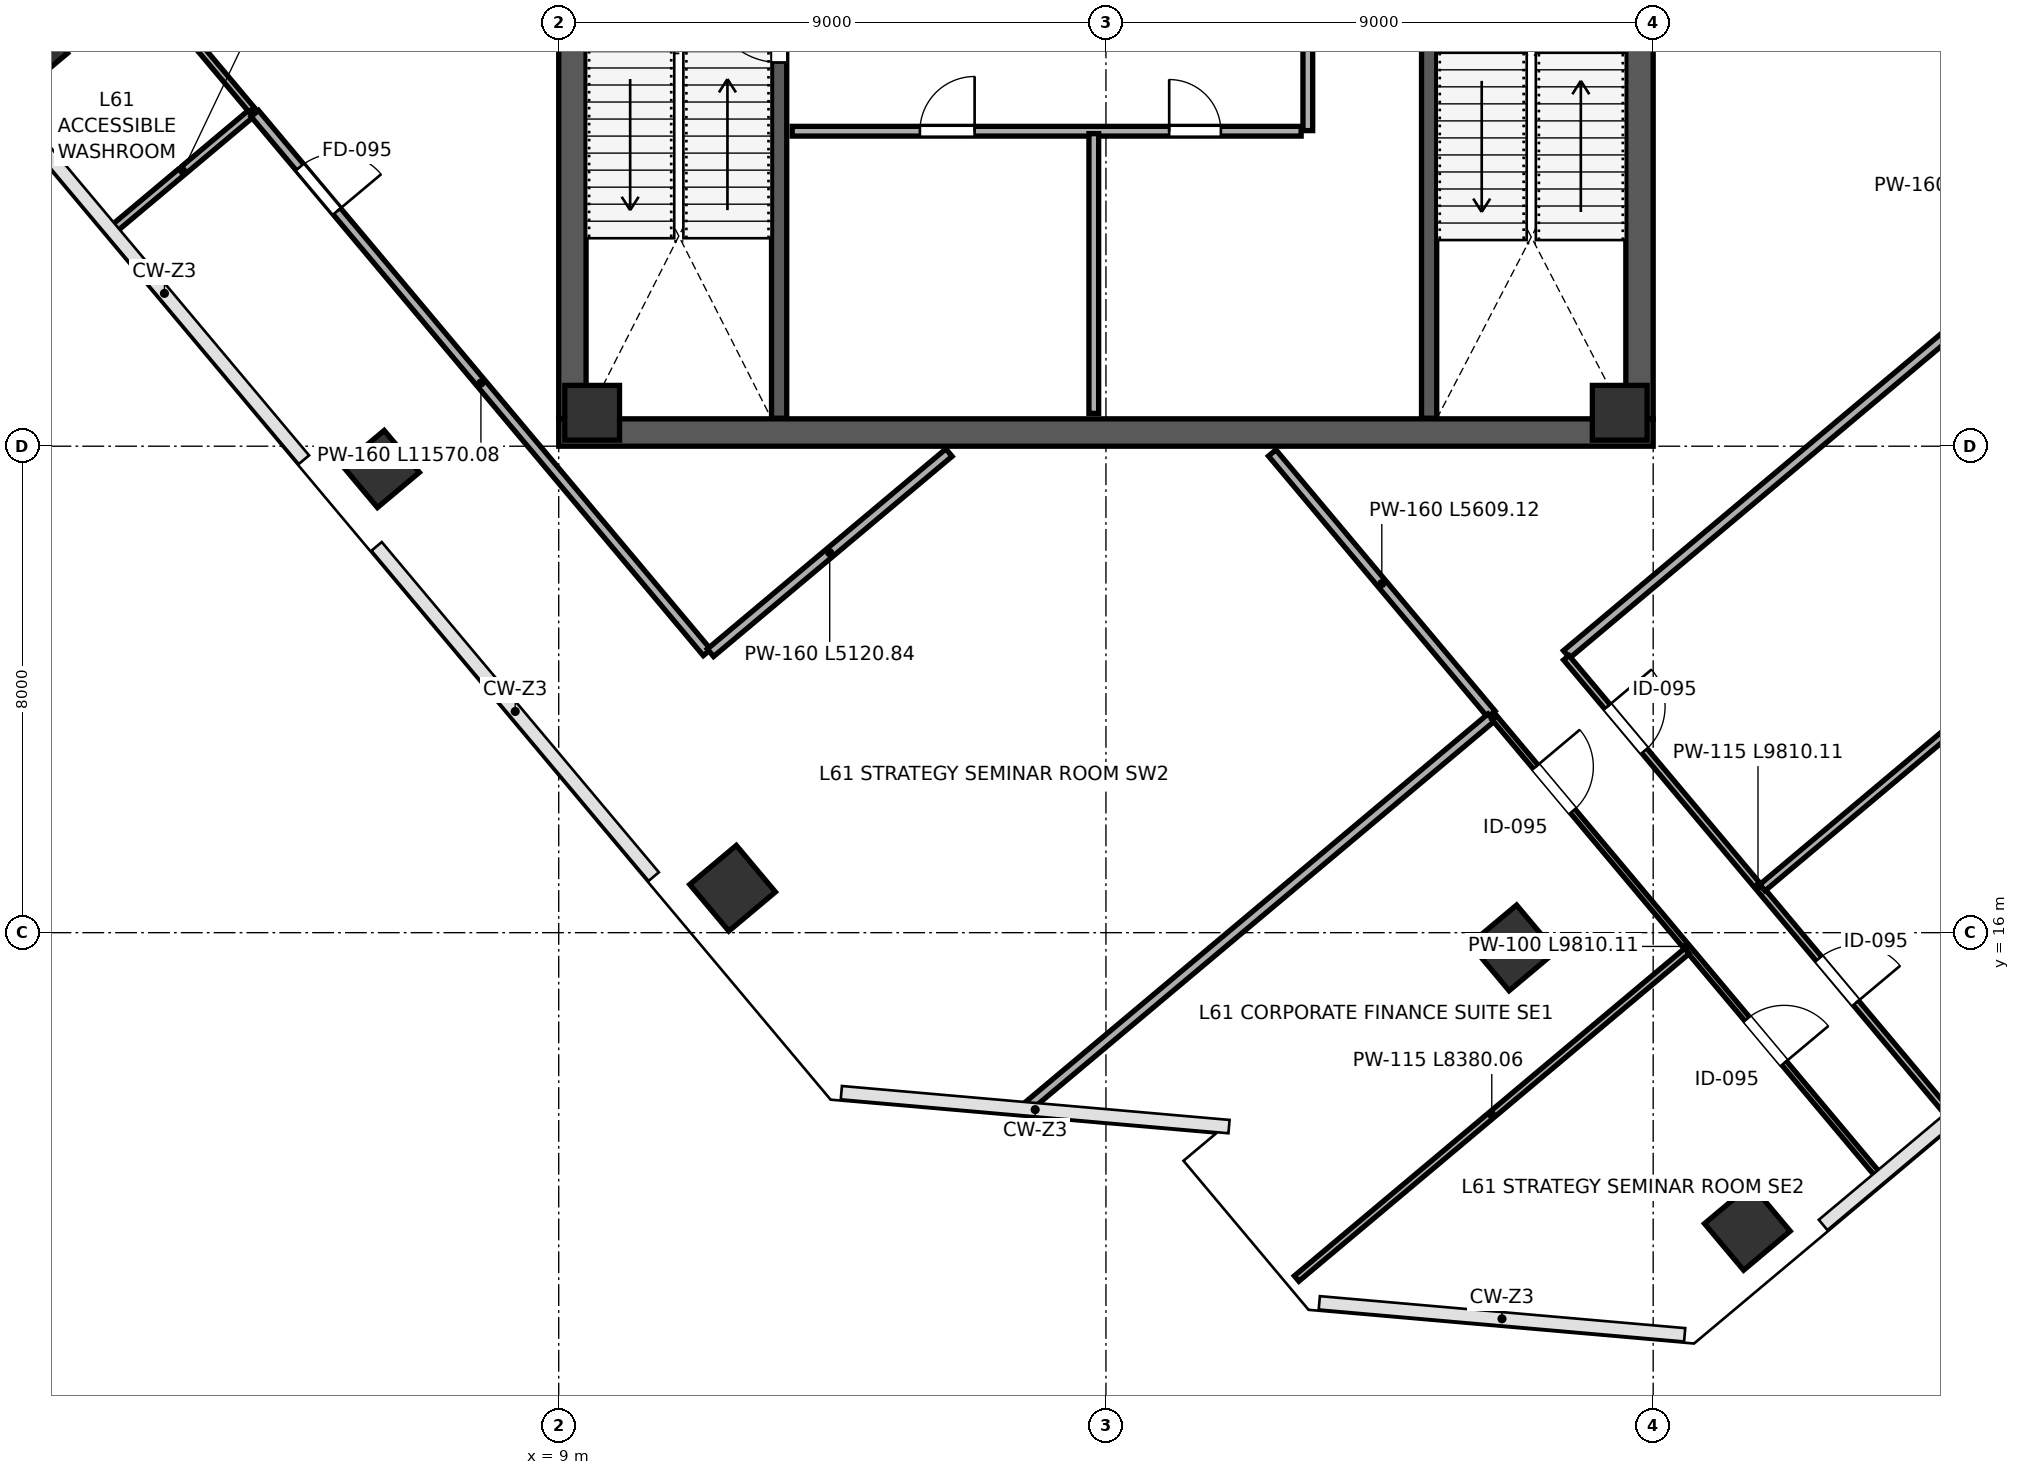
"""IFC4 building model, lengths in metres.
Left out: names, types, materials, properties, quantities, classifications, styles, units other than length and angle.
Written with IfcOpenShell. Run it as: python <this file> out.ifc"""

import sys

from ifc_helpers import new_model, si_unit, direction, frame, frame_2d, origin, origin_2d, place, context, subcontext, project, spatial, rectangle, extrude, source, transform, mapped, element, fill, save


model = new_model("IFC4")
c1 = context("Model", 3, precision=1e-05, world=origin(), true_north=direction((0.0, 1.0)))
c2 = subcontext(c1, "Body", "Model", "MODEL_VIEW")
j1 = project(units=[si_unit("LENGTHUNIT", "METRE"), si_unit("PLANEANGLEUNIT", "RADIAN")], contexts=[c1])
p1 = place(None, origin())
s1 = spatial("IfcSite", under=j1, at=p1, CompositionType="ELEMENT")
p2 = place(p1, origin())
s2 = spatial("IfcBuilding", under=s1, at=p2, CompositionType="ELEMENT")
p3 = place(p2, frame((0.0, 0.0, 271.0)))
s3 = spatial("IfcBuildingStorey", under=s2, at=p3, CompositionType="ELEMENT", Elevation=271.0)
m1 = source(origin(), c2, "Body", "SweptSolid", [
    extrude(rectangle(XDim=0.9, YDim=0.9, at=origin_2d()), origin(), (0.0, 0.0, 1.0), 4.198),
])
for number, where, z_axis, x_axis in (
    (1, (9.55, 24.55, 0.001), (0.0, 0.0, 1.0), (1.0, 0.0, 0.0)),
    (2, (26.45, 24.55, 0.001), (0.0, 0.0, 1.0), (1.0, 0.0, 0.0)),
):
    element("IfcColumn", number, at=place(p3, frame(where, z_axis=z_axis, x_axis=x_axis)), inside=s3, PredefinedType="COLUMN", context=c2, shape_type="MappedRepresentation", body=[
        mapped(m1, transform((0.0, 0.0, 0.0), scale=1.0)),
    ])
m2 = source(origin(), c2, "Body", "SweptSolid", [
    extrude(rectangle(XDim=0.9, YDim=0.9, at=origin_2d()), origin(), (0.0, 0.0, 1.0), 4.198),
])
for number, where, z_axis, x_axis in (
    (3, (0.289, 30.52, 0.001), (0.0, 0.0, 1.0), (-0.643, 0.766, 0.0)),
    (4, (6.074, 23.625, 0.001), (0.0, 0.0, 1.0), (-0.643, 0.766, 0.0)),
):
    element("IfcColumn", number, at=place(p3, frame(where, z_axis=z_axis, x_axis=x_axis)), inside=s3, PredefinedType="COLUMN", context=c2, shape_type="MappedRepresentation", body=[
        mapped(m2, transform((0.0, 0.0, 0.0), scale=1.0)),
    ])
m3 = source(origin(), c2, "Body", "SweptSolid", [
    extrude(rectangle(XDim=1.0, YDim=1.0, at=origin_2d()), origin(), (0.0, 0.0, 1.0), 4.198),
])
p4 = place(p3, frame((11.859, 16.731, 0.001), z_axis=(0.0, 0.0, 1.0), x_axis=(-0.642787609687, 0.766044443119, 0.0)))
e5 = element("IfcColumn", 5, at=p4, inside=s3, PredefinedType="COLUMN", context=c2, shape_type="MappedRepresentation", body=[
    mapped(m3, transform((0.0, 0.0, 0.0), scale=1.0)),
])
m4 = source(origin(), c2, "Body", "SweptSolid", [
    extrude(rectangle(XDim=1.0, YDim=1.0, at=origin_2d()), origin(), (0.0, 0.0, 1.0), 4.198),
])
p5 = place(p3, frame((24.692, 15.75, 0.001), z_axis=(0.0, 0.0, 1.0), x_axis=(-0.642787609687, 0.766044443119, 0.0)))
e6 = element("IfcColumn", 6, at=p5, inside=s3, PredefinedType="COLUMN", context=c2, shape_type="MappedRepresentation", body=[
    mapped(m4, transform((0.0, 0.0, 0.0), scale=1.0)),
])
p6 = place(p3, frame((28.549, 11.154, 0.001), z_axis=(0.0, 0.0, 1.0), x_axis=(-0.642787609687, 0.766044443119, 0.0)))
e7 = element("IfcColumn", 7, at=p6, inside=s3, PredefinedType="COLUMN", context=c2, shape_type="MappedRepresentation", body=[
    mapped(m3, transform((0.0, 0.0, 0.0), scale=1.0)),
])
p7 = place(p3, frame((9.225, 24.45, 0.0), z_axis=(0.0, 0.0, 1.0), x_axis=(0.0, 1.0, 0.0)))
e8 = element("IfcWall", 8, at=p7, inside=s3, PredefinedType="SHEAR", context=c2, shape_type="SweptSolid", body=[
    extrude(rectangle(XDim=15.1, YDim=0.45, at=frame_2d((7.55, 0.0))), origin(), (0.0, 0.0, 1.0), 3.96),
])
p8 = place(p7, frame((8.7, 0.0, 0.0)))
e9 = element("IfcOpeningElement", 9, at=p8, cuts=e8, PredefinedType="OPENING", context=c2, shape_type="SweptSolid", body=[
    extrude(rectangle(XDim=1.15, YDim=2.2, at=frame_2d((0.575, 1.1))), frame((0.0, 0.235, 0.0), z_axis=(0.0, -1.0, 0.0), x_axis=(1.0, 0.0, 0.0)), (0.0, 0.0, 1.0), 0.47),
])
p9 = place(p3, frame((26.775, 24.45, 0.0), z_axis=(0.0, 0.0, 1.0), x_axis=(0.0, 1.0, 0.0)))
e10 = element("IfcWall", 10, at=p9, inside=s3, PredefinedType="SHEAR", context=c2, shape_type="SweptSolid", body=[
    extrude(rectangle(XDim=15.1, YDim=0.45, at=frame_2d((7.55, 0.0))), origin(), (0.0, 0.0, 1.0), 3.96),
])
p10 = place(p9, frame((8.6, 0.0, 0.0)))
e11 = element("IfcOpeningElement", 11, at=p10, cuts=e10, PredefinedType="OPENING", context=c2, shape_type="SweptSolid", body=[
    extrude(rectangle(XDim=1.15, YDim=2.2, at=frame_2d((0.575, 1.1))), frame((0.0, 0.235, 0.0), z_axis=(0.0, -1.0, 0.0), x_axis=(1.0, 0.0, 0.0)), (0.0, 0.0, 1.0), 0.47),
])
p11 = place(p3, frame((9.0, 24.225, 0.0), z_axis=(0.0, 0.0, 1.0), x_axis=(1.0, 0.0, 0.0)))
e12 = element("IfcWall", 12, at=p11, inside=s3, PredefinedType="SHEAR", context=c2, shape_type="SweptSolid", body=[
    extrude(rectangle(XDim=18.0, YDim=0.45, at=frame_2d((9.0, 0.0))), origin(), (0.0, 0.0, 1.0), 3.96),
])
p12 = place(p3, frame((12.625, 24.46, 0.0), z_axis=(0.0, 0.0, 1.0), x_axis=(0.0, 1.0, 0.0)))
e13 = element("IfcWall", 13, at=p12, inside=s3, PredefinedType="SHEAR", context=c2, shape_type="SweptSolid", body=[
    extrude(rectangle(XDim=7.49, YDim=0.25, at=frame_2d((3.745, 0.0))), origin(), (0.0, 0.0, 1.0), 3.96),
])
p13 = place(p12, frame((5.85, 0.0, 0.0)))
e14 = element("IfcOpeningElement", 14, at=p13, cuts=e13, PredefinedType="OPENING", context=c2, shape_type="SweptSolid", body=[
    extrude(rectangle(XDim=1.15, YDim=2.2, at=frame_2d((0.575, 1.1))), frame((0.0, 0.135, 0.0), z_axis=(0.0, -1.0, 0.0), x_axis=(1.0, 0.0, 0.0)), (0.0, 0.0, 1.0), 0.27),
])
p14 = place(p3, frame((23.315, 24.46, 0.0), z_axis=(0.0, 0.0, 1.0), x_axis=(0.0, 1.0, 0.0)))
e15 = element("IfcWall", 15, at=p14, inside=s3, PredefinedType="SHEAR", context=c2, shape_type="SweptSolid", body=[
    extrude(rectangle(XDim=7.49, YDim=0.25, at=frame_2d((3.745, 0.0))), origin(), (0.0, 0.0, 1.0), 3.96),
])
p15 = place(p3, frame((12.84, 29.18, 0.0), z_axis=(0.0, 0.0, 1.0), x_axis=(1.0, 0.0, 0.0)))
e16 = element("IfcWall", 16, at=p15, inside=s3, PredefinedType="PARTITIONING", context=c2, shape_type="SweptSolid", body=[
    extrude(rectangle(XDim=8.37, YDim=0.16, at=frame_2d((4.185, 0.0))), origin(), (0.0, 0.0, 1.0), 3.96),
])
p16 = place(p15, frame((2.1, 0.0, 0.0)))
e17 = element("IfcOpeningElement", 17, at=p16, cuts=e16, PredefinedType="OPENING", context=c2, shape_type="SweptSolid", body=[
    extrude(rectangle(XDim=0.9, YDim=2.15, at=frame_2d((0.45, 1.075))), frame((0.0, 0.09, 0.0), z_axis=(0.0, -1.0, 0.0), x_axis=(1.0, 0.0, 0.0)), (0.0, 0.0, 1.0), 0.18),
])
p17 = place(p15, frame((6.2, 0.0, 0.0)))
e18 = element("IfcOpeningElement", 18, at=p17, cuts=e16, PredefinedType="OPENING", context=c2, shape_type="SweptSolid", body=[
    extrude(rectangle(XDim=0.85, YDim=2.1, at=frame_2d((0.425, 1.05))), frame((0.0, 0.09, 0.0), z_axis=(0.0, -1.0, 0.0), x_axis=(1.0, 0.0, 0.0)), (0.0, 0.0, 1.0), 0.18),
])
p18 = place(p3, frame((17.8, 24.54, 0.0), z_axis=(0.0, 0.0, 1.0), x_axis=(0.0, 1.0, 0.0)))
e19 = element("IfcWall", 19, at=p18, inside=s3, PredefinedType="PARTITIONING", context=c2, shape_type="SweptSolid", body=[
    extrude(rectangle(XDim=4.6, YDim=0.16, at=frame_2d((2.3, 0.0))), origin(), (0.0, 0.0, 1.0), 3.96),
])
p19 = place(p3, frame((21.32, 29.19, 0.0), z_axis=(0.0, 0.0, 1.0), x_axis=(0.0, 1.0, 0.0)))
e20 = element("IfcWall", 20, at=p19, inside=s3, PredefinedType="PARTITIONING", context=c2, shape_type="SweptSolid", body=[
    extrude(rectangle(XDim=2.92, YDim=0.16, at=frame_2d((1.46, 0.0))), origin(), (0.0, 0.0, 1.0), 3.96),
])
p20 = place(p3, frame((-0.339, 29.992, 0.0), z_axis=(0.0, 0.0, 1.0), x_axis=(0.766025914603, 0.642809690465, 0.0)))
e21 = element("IfcWall", 21, at=p20, inside=s3, PredefinedType="PARTITIONING", context=c2, shape_type="SweptSolid", body=[
    extrude(rectangle(XDim=2.95, YDim=0.1, at=frame_2d((1.475, 0.0))), origin(), (0.0, 0.0, 1.0), 3.195),
])
p21 = place(p3, frame((1.686, 27.58, 0.0), z_axis=(0.0, 0.0, 1.0), x_axis=(0.766107411761, 0.642712559116, 0.0)))
e22 = element("IfcWall", 22, at=p21, inside=s3, PredefinedType="PARTITIONING", context=c2, shape_type="SweptSolid", body=[
    extrude(rectangle(XDim=2.95, YDim=0.135, at=frame_2d((1.475, 0.0))), origin(), (0.0, 0.0, 1.0), 3.195),
])
p22 = place(p3, frame((-0.819, 35.216, 0.0), z_axis=(0.0, 0.0, 1.0), x_axis=(0.642772999209, -0.766056702528, 0.0)))
e23 = element("IfcWall", 23, at=p22, inside=s3, PredefinedType="PARTITIONING", context=c2, shape_type="SweptSolid", body=[
    extrude(rectangle(XDim=7.42, YDim=0.115, at=frame_2d((3.71, 0.0))), origin(), (0.0, 0.0, 1.0), 3.96),
])
p23 = place(p22, frame((2.9, 0.0, 0.0)))
e24 = element("IfcOpeningElement", 24, at=p23, cuts=e23, PredefinedType="OPENING", context=c2, shape_type="SweptSolid", body=[
    extrude(rectangle(XDim=0.9, YDim=2.15, at=frame_2d((0.45, 1.075))), frame((0.0, 0.067, 0.0), z_axis=(0.0, -1.0, 0.0), x_axis=(1.0, 0.0, 0.0)), (0.0, 0.0, 1.0), 0.135),
])
p24 = place(p22, frame((5.0, 0.0, 0.0)))
e25 = element("IfcOpeningElement", 25, at=p24, cuts=e23, PredefinedType="OPENING", context=c2, shape_type="SweptSolid", body=[
    extrude(rectangle(XDim=0.95, YDim=2.15, at=frame_2d((0.475, 1.075))), frame((0.0, 0.067, 0.0), z_axis=(0.0, -1.0, 0.0), x_axis=(1.0, 0.0, 0.0)), (0.0, 0.0, 1.0), 0.135),
])
p25 = place(p3, frame((4.002, 29.471, 0.0), z_axis=(0.0, 0.0, 1.0), x_axis=(0.642802048813, -0.766032327021, 0.0)))
e26 = element("IfcWall", 26, at=p25, inside=s3, PredefinedType="PARTITIONING", context=c2, shape_type="SweptSolid", body=[
    extrude(rectangle(XDim=11.57, YDim=0.16, at=frame_2d((5.785, 0.0))), origin(), (0.0, 0.0, 1.0), 3.96),
])
p26 = place(p25, frame((1.15, 0.0, 0.0)))
e27 = element("IfcOpeningElement", 27, at=p26, cuts=e26, PredefinedType="OPENING", context=c2, shape_type="SweptSolid", body=[
    extrude(rectangle(XDim=0.95, YDim=2.15, at=frame_2d((0.475, 1.075))), frame((0.0, 0.09, 0.0), z_axis=(0.0, -1.0, 0.0), x_axis=(1.0, 0.0, 0.0)), (0.0, 0.0, 1.0), 0.18),
])
p27 = place(p3, frame((11.495, 20.603, 0.0), z_axis=(0.0, 0.0, 1.0), x_axis=(0.766059769702, 0.642769343734, 0.0)))
e28 = element("IfcWall", 28, at=p27, inside=s3, PredefinedType="PARTITIONING", context=c2, shape_type="SweptSolid", body=[
    extrude(rectangle(XDim=5.121, YDim=0.16, at=frame_2d((2.561, 0.0))), origin(), (0.0, 0.0, 1.0), 3.96),
])
p28 = place(p3, frame((20.734, 23.889, 0.0), z_axis=(0.0, 0.0, 1.0), x_axis=(0.642758145725, -0.766069165353, 0.0)))
e29 = element("IfcWall", 29, at=p28, inside=s3, PredefinedType="PARTITIONING", context=c2, shape_type="SweptSolid", body=[
    extrude(rectangle(XDim=5.609, YDim=0.16, at=frame_2d((2.804, 0.0))), origin(), (0.0, 0.0, 1.0), 3.96),
])
p29 = place(p3, frame((19.528, 51.245, 0.0), z_axis=(0.0, 0.0, 1.0), x_axis=(0.642782364439, -0.766048844374, 0.0)))
e30 = element("IfcWall", 30, at=p29, inside=s3, PredefinedType="PARTITIONING", context=c2, shape_type="SweptSolid", body=[
    extrude(rectangle(XDim=27.34, YDim=0.1, at=frame_2d((13.67, 0.0))), origin(), (0.0, 0.0, 1.0), 3.96),
])
p30 = place(p29, frame((10.8, 0.0, 0.0)))
e31 = element("IfcOpeningElement", 31, at=p30, cuts=e30, PredefinedType="OPENING", context=c2, shape_type="SweptSolid", body=[
    extrude(rectangle(XDim=0.95, YDim=2.15, at=frame_2d((0.475, 1.075))), frame((0.0, 0.06, 0.0), z_axis=(0.0, -1.0, 0.0), x_axis=(1.0, 0.0, 0.0)), (0.0, 0.0, 1.0), 0.12),
])
p31 = place(p3, frame((25.576, 20.577, 0.0), z_axis=(0.0, 0.0, 1.0), x_axis=(0.76604764673, 0.642783791752, 0.0)))
e32 = element("IfcWall", 32, at=p31, inside=s3, PredefinedType="PARTITIONING", context=c2, shape_type="SweptSolid", body=[
    extrude(rectangle(XDim=20.24, YDim=0.16, at=frame_2d((10.12, 0.0))), origin(), (0.0, 0.0, 1.0), 3.195),
])
p32 = place(p3, frame((16.711, 13.139, 0.0), z_axis=(0.0, 0.0, 1.0), x_axis=(0.766041122188, 0.642791567398, 0.0)))
e33 = element("IfcWall", 33, at=p32, inside=s3, PredefinedType="PARTITIONING", context=c2, shape_type="SweptSolid", body=[
    extrude(rectangle(XDim=9.952, YDim=0.16, at=frame_2d((4.976, 0.0))), origin(), (0.0, 0.0, 1.0), 3.96),
])
p33 = place(p3, frame((25.571, 20.521, 0.0), z_axis=(0.0, 0.0, 1.0), x_axis=(0.64278520229, -0.766046463158, 0.0)))
e34 = element("IfcWall", 34, at=p33, inside=s3, PredefinedType="PARTITIONING", context=c2, shape_type="SweptSolid", body=[
    extrude(rectangle(XDim=9.81, YDim=0.115, at=frame_2d((4.905, 0.0))), origin(), (0.0, 0.0, 1.0), 3.96),
])
p34 = place(p33, frame((1.05, 0.0, 0.0)))
e35 = element("IfcOpeningElement", 35, at=p34, cuts=e34, PredefinedType="OPENING", context=c2, shape_type="SweptSolid", body=[
    extrude(rectangle(XDim=0.95, YDim=2.15, at=frame_2d((0.475, 1.075))), frame((0.0, 0.067, 0.0), z_axis=(0.0, -1.0, 0.0), x_axis=(1.0, 0.0, 0.0)), (0.0, 0.0, 1.0), 0.135),
])
p35 = place(p33, frame((6.46, 0.0, 0.0)))
e36 = element("IfcOpeningElement", 36, at=p35, cuts=e34, PredefinedType="OPENING", context=c2, shape_type="SweptSolid", body=[
    extrude(rectangle(XDim=0.95, YDim=2.15, at=frame_2d((0.475, 1.075))), frame((0.0, 0.067, 0.0), z_axis=(0.0, -1.0, 0.0), x_axis=(1.0, 0.0, 0.0)), (0.0, 0.0, 1.0), 0.135),
])
p36 = place(p3, frame((24.391, 19.531, 0.0), z_axis=(0.0, 0.0, 1.0), x_axis=(0.642797456481, -0.76603618057, 0.0)))
e37 = element("IfcWall", 37, at=p36, inside=s3, PredefinedType="PARTITIONING", context=c2, shape_type="SweptSolid", body=[
    extrude(rectangle(XDim=9.81, YDim=0.1, at=frame_2d((4.905, 0.0))), origin(), (0.0, 0.0, 1.0), 3.96),
])
p37 = place(p36, frame((1.05, 0.0, 0.0)))
e38 = element("IfcOpeningElement", 38, at=p37, cuts=e37, PredefinedType="OPENING", context=c2, shape_type="SweptSolid", body=[
    extrude(rectangle(XDim=0.95, YDim=2.15, at=frame_2d((0.475, 1.075))), frame((0.0, 0.06, 0.0), z_axis=(0.0, -1.0, 0.0), x_axis=(1.0, 0.0, 0.0)), (0.0, 0.0, 1.0), 0.12),
])
p38 = place(p36, frame((6.46, 0.0, 0.0)))
e39 = element("IfcOpeningElement", 39, at=p38, cuts=e37, PredefinedType="OPENING", context=c2, shape_type="SweptSolid", body=[
    extrude(rectangle(XDim=0.95, YDim=2.15, at=frame_2d((0.475, 1.075))), frame((0.0, 0.06, 0.0), z_axis=(0.0, -1.0, 0.0), x_axis=(1.0, 0.0, 0.0)), (0.0, 0.0, 1.0), 0.12),
])
p39 = place(p3, frame((28.796, 16.74, 0.0), z_axis=(0.0, 0.0, 1.0), x_axis=(0.766036723368, 0.642796809616, 0.0)))
e40 = element("IfcWall", 40, at=p39, inside=s3, PredefinedType="PARTITIONING", context=c2, shape_type="SweptSolid", body=[
    extrude(rectangle(XDim=20.24, YDim=0.135, at=frame_2d((10.12, 0.0))), origin(), (0.0, 0.0, 1.0), 3.96),
])
p40 = place(p3, frame((21.136, 10.312, 0.0), z_axis=(0.0, 0.0, 1.0), x_axis=(0.766048541695, 0.642782725162, 0.0)))
e41 = element("IfcWall", 41, at=p40, inside=s3, PredefinedType="PARTITIONING", context=c2, shape_type="SweptSolid", body=[
    extrude(rectangle(XDim=8.38, YDim=0.115, at=frame_2d((4.19, 0.0))), origin(), (0.0, 0.0, 1.0), 3.96),
])
m5 = source(origin(), c2, "Body", "SweptSolid", [
    extrude(rectangle(XDim=1.15, YDim=2.2, at=frame_2d((0.575, 1.1))), frame((0.0, 0.025, 0.0), z_axis=(0.0, -1.0, 0.0), x_axis=(1.0, 0.0, 0.0)), (0.0, 0.0, 1.0), 0.05),
])
p41 = place(p13, origin())
e42 = element("IfcDoor", 42, at=p41, inside=s3, OperationType="SINGLE_SWING_RIGHT", PredefinedType="DOOR", context=c2, shape_type="MappedRepresentation", body=[
    mapped(m5, transform((0.0, 0.0, 0.0), scale=1.0)),
])
fill(e14, e42)
m6 = source(origin(), c2, "Body", "SweptSolid", [
    extrude(rectangle(XDim=0.9, YDim=2.15, at=frame_2d((0.45, 1.075))), frame((0.0, 0.025, 0.0), z_axis=(0.0, -1.0, 0.0), x_axis=(1.0, 0.0, 0.0)), (0.0, 0.0, 1.0), 0.05),
])
p42 = place(p16, origin())
e43 = element("IfcDoor", 43, at=p42, inside=s3, OperationType="SINGLE_SWING_RIGHT", PredefinedType="DOOR", context=c2, shape_type="MappedRepresentation", body=[
    mapped(m6, transform((0.0, 0.0, 0.0), scale=1.0)),
])
fill(e17, e43)
m7 = source(origin(), c2, "Body", "SweptSolid", [
    extrude(rectangle(XDim=0.85, YDim=2.1, at=frame_2d((0.425, 1.05))), frame((0.0, 0.025, 0.0), z_axis=(0.0, -1.0, 0.0), x_axis=(1.0, 0.0, 0.0)), (0.0, 0.0, 1.0), 0.05),
])
p43 = place(p17, origin())
e44 = element("IfcDoor", 44, at=p43, inside=s3, OperationType="SINGLE_SWING_LEFT", PredefinedType="DOOR", context=c2, shape_type="MappedRepresentation", body=[
    mapped(m7, transform((0.0, 0.0, 0.0), scale=1.0)),
])
fill(e18, e44)
m8 = source(origin(), c2, "Body", "SweptSolid", [
    extrude(rectangle(XDim=0.95, YDim=2.15, at=frame_2d((0.475, 1.075))), frame((0.0, 0.025, 0.0), z_axis=(0.0, -1.0, 0.0), x_axis=(1.0, 0.0, 0.0)), (0.0, 0.0, 1.0), 0.05),
])
p44 = place(p26, origin())
e45 = element("IfcDoor", 45, at=p44, inside=s3, OperationType="SINGLE_SWING_RIGHT", PredefinedType="DOOR", context=c2, shape_type="MappedRepresentation", body=[
    mapped(m8, transform((0.0, 0.0, 0.0), scale=1.0)),
])
fill(e27, e45)
m9 = source(origin(), c2, "Body", "SweptSolid", [
    extrude(rectangle(XDim=0.95, YDim=2.15, at=frame_2d((0.475, 1.075))), frame((0.0, 0.025, 0.0), z_axis=(0.0, -1.0, 0.0), x_axis=(1.0, 0.0, 0.0)), (0.0, 0.0, 1.0), 0.05),
])
p45 = place(p34, origin())
e46 = element("IfcDoor", 46, at=p45, inside=s3, OperationType="SINGLE_SWING_LEFT", PredefinedType="DOOR", context=c2, shape_type="MappedRepresentation", body=[
    mapped(m9, transform((0.0, 0.0, 0.0), scale=1.0)),
])
fill(e35, e46)
p46 = place(p35, origin())
e47 = element("IfcDoor", 47, at=p46, inside=s3, OperationType="SINGLE_SWING_RIGHT", PredefinedType="DOOR", context=c2, shape_type="MappedRepresentation", body=[
    mapped(m9, transform((0.0, 0.0, 0.0), scale=1.0)),
])
fill(e36, e47)
p47 = place(p37, origin())
e48 = element("IfcDoor", 48, at=p47, inside=s3, OperationType="SINGLE_SWING_LEFT", PredefinedType="DOOR", context=c2, shape_type="MappedRepresentation", body=[
    mapped(m9, transform((0.0, 0.0, 0.0), scale=1.0)),
])
fill(e38, e48)
p48 = place(p38, origin())
e49 = element("IfcDoor", 49, at=p48, inside=s3, OperationType="SINGLE_SWING_RIGHT", PredefinedType="DOOR", context=c2, shape_type="MappedRepresentation", body=[
    mapped(m9, transform((0.0, 0.0, 0.0), scale=1.0)),
])
fill(e39, e49)
save(model, sys.argv[1])
